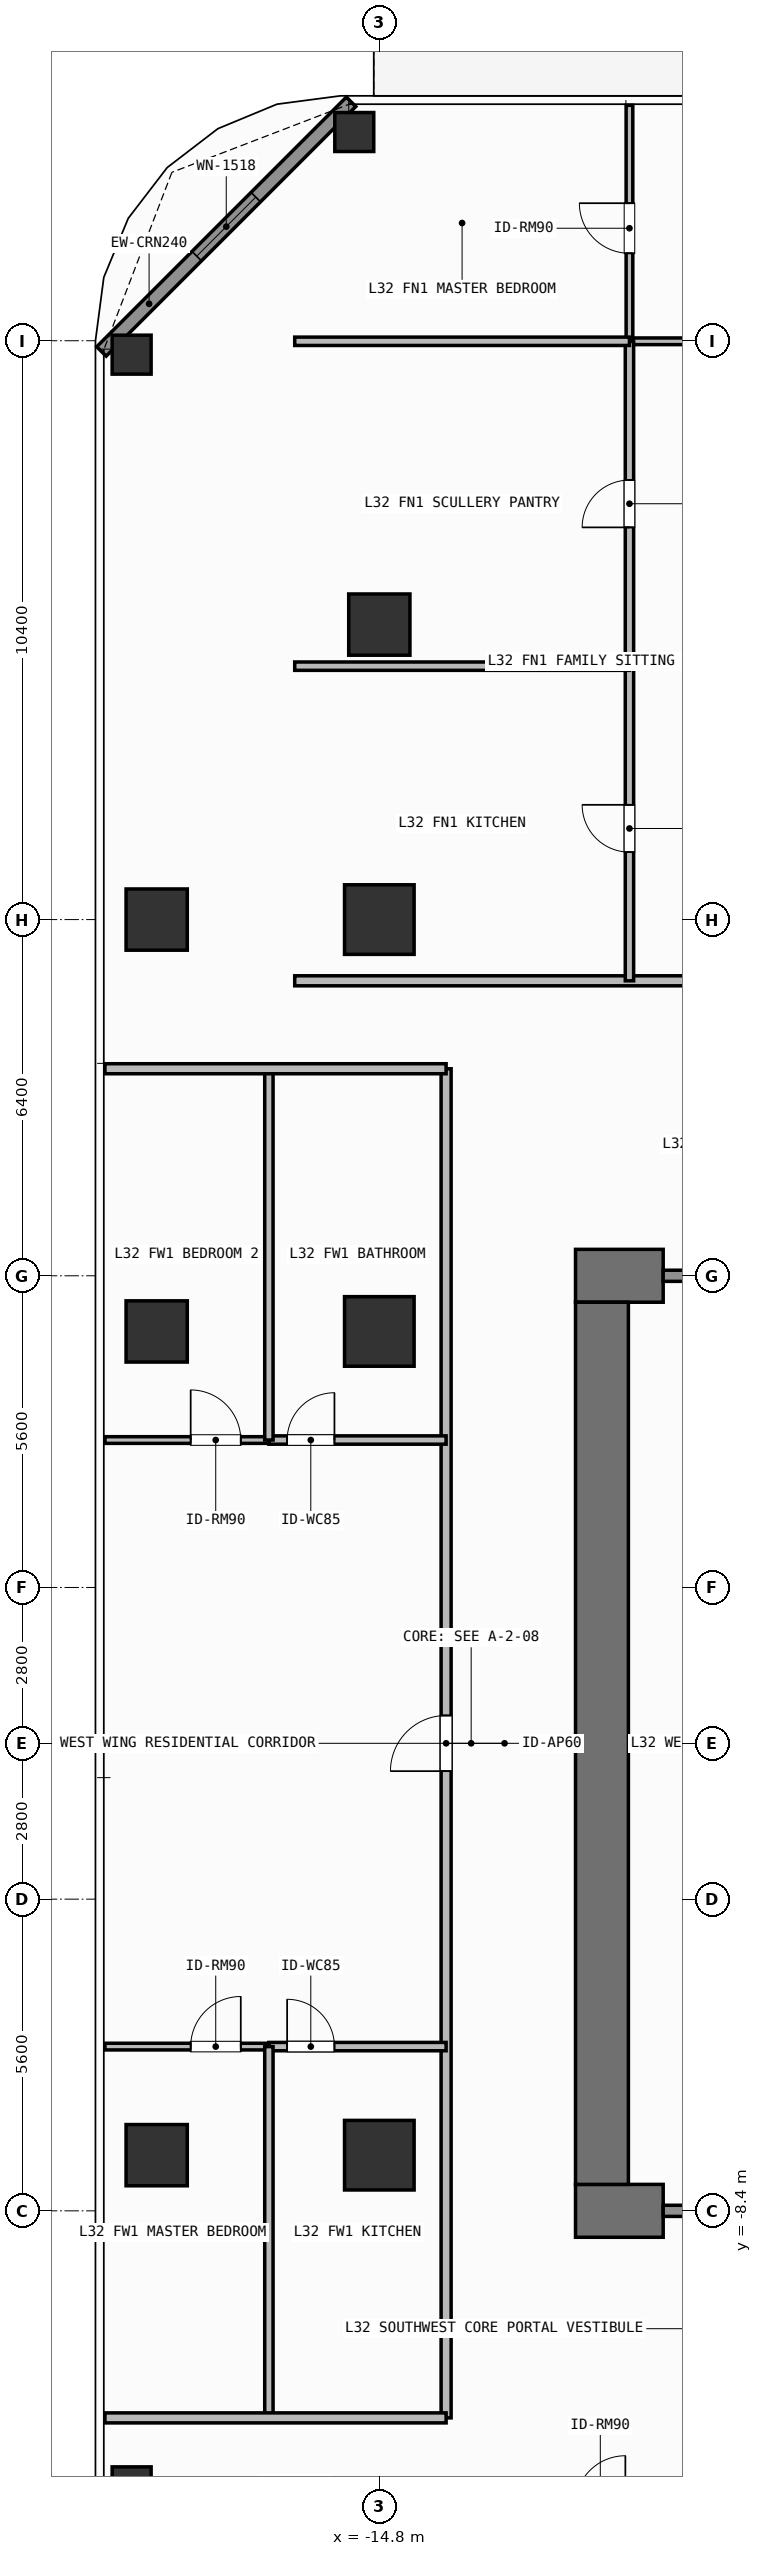
"""IFC4 building model, lengths in metres.
Left out: names, types, materials, properties, quantities, classifications, styles, units other than length and angle.
Written with IfcOpenShell. Run it as: python <this file> out.ifc"""

import sys

from ifc_helpers import new_model, si_unit, direction, frame, frame_2d, origin, origin_2d, place, context, subcontext, project, spatial, rectangle, hollow_rectangle, extrude, element, fill, save


model = new_model("IFC4")
c1 = context("Model", 3, precision=1e-05, world=origin(), true_north=direction((0.0, 1.0)))
c2 = subcontext(c1, "Body", "Model", "MODEL_VIEW")
j1 = project(units=[si_unit("LENGTHUNIT", "METRE"), si_unit("PLANEANGLEUNIT", "RADIAN")], contexts=[c1])
p1 = place(None, origin())
s1 = spatial("IfcSite", under=j1, at=p1, CompositionType="ELEMENT")
p2 = place(p1, origin())
s2 = spatial("IfcBuilding", under=s1, at=p2, CompositionType="ELEMENT")
p3 = place(p2, frame((0.0, 0.0, 129.0)))
s3 = spatial("IfcBuildingStorey", under=s2, at=p3, CompositionType="ELEMENT", Elevation=129.0)
for number, where, z_axis, x_axis in (
    (1, (-11.275, -8.4, 0.0), (0.0, 0.0, 1.0), (1.0, 0.0, 0.0)),
    (2, (-11.275, 8.4, 0.0), (0.0, 0.0, 1.0), (1.0, 0.0, 0.0)),
):
    element("IfcWall", number, at=place(p3, frame(where, z_axis=z_axis, x_axis=x_axis)), inside=s3, PredefinedType="SHEAR", context=c2, shape_type="SweptSolid", body=[
        extrude(rectangle(XDim=1.575, YDim=0.95, at=frame_2d((0.788, 0.0))), origin(), (0.0, 0.0, 1.0), 3.9),
    ])
p4 = place(p3, frame((-10.8, -7.925, 0.0), z_axis=(0.0, 0.0, 1.0), x_axis=(0.0, 1.0, 0.0)))
e3 = element("IfcWall", 3, at=p4, inside=s3, PredefinedType="SHEAR", context=c2, shape_type="SweptSolid", body=[
    extrude(rectangle(XDim=15.85, YDim=0.95, at=frame_2d((7.925, 0.0))), origin(), (0.0, 0.0, 1.0), 3.9),
])
for number, where, z_axis, x_axis in (
    (4, (-14.8, 14.8, 0.0), (0.0, 0.0, 1.0), (1.0, 0.0, 0.0)),
    (5, (-14.8, -7.4, 0.0), (0.0, 0.0, 1.0), (1.0, 0.0, 0.0)),
    (6, (-14.8, 7.4, 0.0), (0.0, 0.0, 1.0), (1.0, 0.0, 0.0)),
):
    element("IfcColumn", number, at=place(p3, frame(where, z_axis=z_axis, x_axis=x_axis)), inside=s3, PredefinedType="COLUMN", context=c2, shape_type="SweptSolid", body=[
        extrude(rectangle(XDim=1.25, YDim=1.25, at=origin_2d()), origin(), (0.0, 0.0, 1.0), 3.9),
    ])
for number, where, z_axis, x_axis in (
    (7, (-18.8, -7.4, 0.0), (0.0, 0.0, 1.0), (1.0, 0.0, 0.0)),
    (8, (-18.8, 7.4, 0.0), (0.0, 0.0, 1.0), (1.0, 0.0, 0.0)),
    (9, (-18.8, 14.8, 0.0), (0.0, 0.0, 1.0), (1.0, 0.0, 0.0)),
    (10, (-14.8, 20.1, 0.0), (0.0, 0.0, 1.0), (1.0, 0.0, 0.0)),
):
    element("IfcColumn", number, at=place(p3, frame(where, z_axis=z_axis, x_axis=x_axis)), inside=s3, PredefinedType="COLUMN", context=c2, shape_type="SweptSolid", body=[
        extrude(rectangle(XDim=1.1, YDim=1.1, at=origin_2d()), origin(), (0.0, 0.0, 1.0), 3.9),
    ])
for number, where, z_axis, x_axis in (
    (11, (-15.25, 28.95, 0.0), (0.0, 0.0, 1.0), (1.0, 0.0, 0.0)),
    (12, (-19.25, -13.35, 0.0), (0.0, 0.0, 1.0), (1.0, 0.0, 0.0)),
    (13, (-19.25, 24.95, 0.0), (0.0, 0.0, 1.0), (1.0, 0.0, 0.0)),
):
    element("IfcColumn", number, at=place(p3, frame(where, z_axis=z_axis, x_axis=x_axis)), inside=s3, PredefinedType="COLUMN", context=c2, shape_type="SweptSolid", body=[
        extrude(hollow_rectangle(XDim=0.7, YDim=0.7, WallThickness=0.032, at=origin_2d()), origin(), (0.0, 0.0, 1.0), 3.9),
    ])
p5 = place(p3, frame((-19.792, 25.008, 0.0), z_axis=(0.0, 0.0, 1.0), x_axis=(0.707106781187, 0.707106781187, 0.0)))
e14 = element("IfcWall", 14, at=p5, inside=s3, PredefinedType="SOLIDWALL", context=c2, shape_type="SweptSolid", body=[
    extrude(rectangle(XDim=6.343, YDim=0.24, at=frame_2d((3.171, 0.0))), origin(), (0.0, 0.0, 1.0), 3.68),
])
p6 = place(p5, frame((2.421, 0.0, 0.8)))
e15 = element("IfcOpeningElement", 15, at=p6, cuts=e14, PredefinedType="OPENING", context=c2, shape_type="SweptSolid", body=[
    extrude(rectangle(XDim=1.5, YDim=1.85, at=frame_2d((0.75, 0.925))), frame((0.0, 0.13, 0.0), z_axis=(0.0, -1.0, 0.0), x_axis=(1.0, 0.0, 0.0)), (0.0, 0.0, 1.0), 0.26),
])
p7 = place(p3, frame((-9.7, -8.4, 0.0), z_axis=(0.0, 0.0, 1.0), x_axis=(1.0, 0.0, 0.0)))
e16 = element("IfcWall", 16, at=p7, inside=s3, PredefinedType="SOLIDWALL", context=c2, shape_type="SweptSolid", body=[
    extrude(rectangle(XDim=2.15, YDim=0.2, at=frame_2d((1.075, 0.0))), origin(), (0.0, 0.0, 1.0), 2.72),
])
p8 = place(p7, frame((0.598, 0.0, 0.0)))
e17 = element("IfcOpeningElement", 17, at=p8, cuts=e16, PredefinedType="OPENING", context=c2, shape_type="SweptSolid", body=[
    extrude(rectangle(XDim=1.1, YDim=2.15, at=frame_2d((0.55, 1.075))), frame((0.0, 0.11, 0.0), z_axis=(0.0, -1.0, 0.0), x_axis=(1.0, 0.0, 0.0)), (0.0, 0.0, 1.0), 0.22),
])
p9 = place(p3, frame((-9.7, 8.4, 0.0), z_axis=(0.0, 0.0, 1.0), x_axis=(1.0, 0.0, 0.0)))
e18 = element("IfcWall", 18, at=p9, inside=s3, PredefinedType="SOLIDWALL", context=c2, shape_type="SweptSolid", body=[
    extrude(rectangle(XDim=2.15, YDim=0.2, at=frame_2d((1.075, 0.0))), origin(), (0.0, 0.0, 1.0), 2.72),
])
p10 = place(p9, frame((0.598, 0.0, 0.0)))
e19 = element("IfcOpeningElement", 19, at=p10, cuts=e18, PredefinedType="OPENING", context=c2, shape_type="SweptSolid", body=[
    extrude(rectangle(XDim=1.1, YDim=2.15, at=frame_2d((0.55, 1.075))), frame((0.0, 0.11, 0.0), z_axis=(0.0, -1.0, 0.0), x_axis=(1.0, 0.0, 0.0)), (0.0, 0.0, 1.0), 0.22),
])
p11 = place(p3, frame((-16.32, 13.7, 0.0), z_axis=(0.0, 0.0, 1.0), x_axis=(1.0, 0.0, 0.0)))
e20 = element("IfcWall", 20, at=p11, inside=s3, PredefinedType="PARTITIONING", context=c2, shape_type="SweptSolid", body=[
    extrude(rectangle(XDim=17.794, YDim=0.18, at=frame_2d((8.897, 0.0))), origin(), (0.0, 0.0, 1.0), 3.68),
])
p12 = place(p11, frame((9.65, 0.0, 0.0)))
e21 = element("IfcOpeningElement", 21, at=p12, cuts=e20, PredefinedType="OPENING", context=c2, shape_type="SweptSolid", body=[
    extrude(rectangle(XDim=1.0, YDim=2.2, at=frame_2d((0.5, 1.1))), frame((0.0, 0.1, 0.0), z_axis=(0.0, -1.0, 0.0), x_axis=(1.0, 0.0, 0.0)), (0.0, 0.0, 1.0), 0.2),
])
p13 = place(p3, frame((-10.306, 25.19, 0.0), z_axis=(0.0, 0.0, 1.0), x_axis=(1.0, 0.0, 0.0)))
e22 = element("IfcWall", 22, at=p13, inside=s3, PredefinedType="PARTITIONING", context=c2, shape_type="SweptSolid", body=[
    extrude(rectangle(XDim=6.228, YDim=0.12, at=frame_2d((3.114, 0.0))), origin(), (0.0, 0.0, 1.0), 3.68),
])
p14 = place(p13, frame((2.664, 0.0, 0.0)))
e23 = element("IfcOpeningElement", 23, at=p14, cuts=e22, PredefinedType="OPENING", context=c2, shape_type="SweptSolid", body=[
    extrude(rectangle(XDim=0.9, YDim=2.1, at=frame_2d((0.45, 1.05))), frame((0.0, 0.07, 0.0), z_axis=(0.0, -1.0, 0.0), x_axis=(1.0, 0.0, 0.0)), (0.0, 0.0, 1.0), 0.14),
])
p15 = place(p3, frame((-10.306, 13.7, 0.0), z_axis=(0.0, 0.0, 1.0), x_axis=(0.0, 1.0, 0.0)))
e24 = element("IfcWall", 24, at=p15, inside=s3, PredefinedType="PARTITIONING", context=c2, shape_type="SweptSolid", body=[
    extrude(rectangle(XDim=5.653, YDim=0.15, at=frame_2d((2.827, 0.0))), origin(), (0.0, 0.0, 1.0), 3.68),
])
p16 = place(p15, frame((2.312, 0.0, 0.0)))
e25 = element("IfcOpeningElement", 25, at=p16, cuts=e24, PredefinedType="OPENING", context=c2, shape_type="SweptSolid", body=[
    extrude(rectangle(XDim=0.85, YDim=2.1, at=frame_2d((0.425, 1.05))), frame((0.0, 0.085, 0.0), z_axis=(0.0, -1.0, 0.0), x_axis=(1.0, 0.0, 0.0)), (0.0, 0.0, 1.0), 0.17),
])
p17 = place(p3, frame((-10.306, 19.353, 0.0), z_axis=(0.0, 0.0, 1.0), x_axis=(0.0, 1.0, 0.0)))
e26 = element("IfcWall", 26, at=p17, inside=s3, PredefinedType="PARTITIONING", context=c2, shape_type="SweptSolid", body=[
    extrude(rectangle(XDim=5.837, YDim=0.15, at=frame_2d((2.918, 0.0))), origin(), (0.0, 0.0, 1.0), 3.68),
])
p18 = place(p17, frame((2.493, 0.0, 0.0)))
e27 = element("IfcOpeningElement", 27, at=p18, cuts=e26, PredefinedType="OPENING", context=c2, shape_type="SweptSolid", body=[
    extrude(rectangle(XDim=0.85, YDim=2.1, at=frame_2d((0.425, 1.05))), frame((0.0, 0.085, 0.0), z_axis=(0.0, -1.0, 0.0), x_axis=(1.0, 0.0, 0.0)), (0.0, 0.0, 1.0), 0.17),
])
p19 = place(p3, frame((-10.306, 25.19, 0.0), z_axis=(0.0, 0.0, 1.0), x_axis=(0.0, 1.0, 0.0)))
e28 = element("IfcWall", 28, at=p19, inside=s3, PredefinedType="PARTITIONING", context=c2, shape_type="SweptSolid", body=[
    extrude(rectangle(XDim=4.24, YDim=0.12, at=frame_2d((2.12, 0.0))), origin(), (0.0, 0.0, 1.0), 3.68),
])
p20 = place(p19, frame((1.581, 0.0, 0.0)))
e29 = element("IfcOpeningElement", 29, at=p20, cuts=e28, PredefinedType="OPENING", context=c2, shape_type="SweptSolid", body=[
    extrude(rectangle(XDim=0.9, YDim=2.1, at=frame_2d((0.45, 1.05))), frame((0.0, 0.07, 0.0), z_axis=(0.0, -1.0, 0.0), x_axis=(1.0, 0.0, 0.0)), (0.0, 0.0, 1.0), 0.14),
])
p21 = place(p3, frame((-13.6, -12.12, 0.0), z_axis=(0.0, 0.0, 1.0), x_axis=(0.0, 1.0, 0.0)))
e30 = element("IfcWall", 30, at=p21, inside=s3, PredefinedType="PARTITIONING", context=c2, shape_type="SweptSolid", body=[
    extrude(rectangle(XDim=24.24, YDim=0.18, at=frame_2d((12.12, 0.0))), origin(), (0.0, 0.0, 1.0), 3.68),
])
p22 = place(p21, frame((11.62, 0.0, 0.0)))
e31 = element("IfcOpeningElement", 31, at=p22, cuts=e30, PredefinedType="OPENING", context=c2, shape_type="SweptSolid", body=[
    extrude(rectangle(XDim=1.0, YDim=2.2, at=frame_2d((0.5, 1.1))), frame((0.0, 0.1, 0.0), z_axis=(0.0, -1.0, 0.0), x_axis=(1.0, 0.0, 0.0)), (0.0, 0.0, 1.0), 0.2),
])
p23 = place(p3, frame((-16.784, 5.449, 0.0), z_axis=(0.0, 0.0, 1.0), x_axis=(1.0, 0.0, 0.0)))
e32 = element("IfcWall", 32, at=p23, inside=s3, PredefinedType="PARTITIONING", context=c2, shape_type="SweptSolid", body=[
    extrude(rectangle(XDim=3.184, YDim=0.15, at=frame_2d((1.592, 0.0))), origin(), (0.0, 0.0, 1.0), 3.68),
])
p24 = place(p23, frame((0.328, 0.0, 0.0)))
e33 = element("IfcOpeningElement", 33, at=p24, cuts=e32, PredefinedType="OPENING", context=c2, shape_type="SweptSolid", body=[
    extrude(rectangle(XDim=0.85, YDim=2.1, at=frame_2d((0.425, 1.05))), frame((0.0, 0.085, 0.0), z_axis=(0.0, -1.0, 0.0), x_axis=(1.0, 0.0, 0.0)), (0.0, 0.0, 1.0), 0.17),
])
p25 = place(p3, frame((-16.784, -5.449, 0.0), z_axis=(0.0, 0.0, 1.0), x_axis=(1.0, 0.0, 0.0)))
e34 = element("IfcWall", 34, at=p25, inside=s3, PredefinedType="PARTITIONING", context=c2, shape_type="SweptSolid", body=[
    extrude(rectangle(XDim=3.184, YDim=0.15, at=frame_2d((1.592, 0.0))), origin(), (0.0, 0.0, 1.0), 3.68),
])
p26 = place(p25, frame((0.328, 0.0, 0.0)))
e35 = element("IfcOpeningElement", 35, at=p26, cuts=e34, PredefinedType="OPENING", context=c2, shape_type="SweptSolid", body=[
    extrude(rectangle(XDim=0.85, YDim=2.1, at=frame_2d((0.425, 1.05))), frame((0.0, 0.085, 0.0), z_axis=(0.0, -1.0, 0.0), x_axis=(1.0, 0.0, 0.0)), (0.0, 0.0, 1.0), 0.17),
])
p27 = place(p3, frame((-19.73, -5.449, 0.0), z_axis=(0.0, 0.0, 1.0), x_axis=(1.0, 0.0, 0.0)))
e36 = element("IfcWall", 36, at=p27, inside=s3, PredefinedType="PARTITIONING", context=c2, shape_type="SweptSolid", body=[
    extrude(rectangle(XDim=2.946, YDim=0.12, at=frame_2d((1.473, 0.0))), origin(), (0.0, 0.0, 1.0), 3.68),
])
p28 = place(p27, frame((1.541, 0.0, 0.0)))
e37 = element("IfcOpeningElement", 37, at=p28, cuts=e36, PredefinedType="OPENING", context=c2, shape_type="SweptSolid", body=[
    extrude(rectangle(XDim=0.9, YDim=2.1, at=frame_2d((0.45, 1.05))), frame((0.0, 0.07, 0.0), z_axis=(0.0, -1.0, 0.0), x_axis=(1.0, 0.0, 0.0)), (0.0, 0.0, 1.0), 0.14),
])
p29 = place(p3, frame((-19.73, 5.449, 0.0), z_axis=(0.0, 0.0, 1.0), x_axis=(1.0, 0.0, 0.0)))
e38 = element("IfcWall", 38, at=p29, inside=s3, PredefinedType="PARTITIONING", context=c2, shape_type="SweptSolid", body=[
    extrude(rectangle(XDim=2.946, YDim=0.12, at=frame_2d((1.473, 0.0))), origin(), (0.0, 0.0, 1.0), 3.68),
])
p30 = place(p29, frame((1.541, 0.0, 0.0)))
e39 = element("IfcOpeningElement", 39, at=p30, cuts=e38, PredefinedType="OPENING", context=c2, shape_type="SweptSolid", body=[
    extrude(rectangle(XDim=0.9, YDim=2.1, at=frame_2d((0.45, 1.05))), frame((0.0, 0.07, 0.0), z_axis=(0.0, -1.0, 0.0), x_axis=(1.0, 0.0, 0.0)), (0.0, 0.0, 1.0), 0.14),
])
for number, where, z_axis, x_axis in (
    (40, (-16.32, 19.353, 0.0), (0.0, 0.0, 1.0), (1.0, 0.0, 0.0)),
    (41, (-16.32, 25.19, 0.0), (0.0, 0.0, 1.0), (1.0, 0.0, 0.0)),
):
    element("IfcWall", number, at=place(p3, frame(where, z_axis=z_axis, x_axis=x_axis)), inside=s3, PredefinedType="PARTITIONING", context=c2, shape_type="SweptSolid", body=[
        extrude(rectangle(XDim=6.014, YDim=0.15, at=frame_2d((3.007, 0.0))), origin(), (0.0, 0.0, 1.0), 3.68),
    ])
for number, where, z_axis, x_axis in (
    (42, (-16.784, -12.12, 0.0), (0.0, 0.0, 1.0), (0.0, 1.0, 0.0)),
    (43, (-16.784, 5.449, 0.0), (0.0, 0.0, 1.0), (0.0, 1.0, 0.0)),
):
    element("IfcWall", number, at=place(p3, frame(where, z_axis=z_axis, x_axis=x_axis)), inside=s3, PredefinedType="PARTITIONING", context=c2, shape_type="SweptSolid", body=[
        extrude(rectangle(XDim=6.671, YDim=0.15, at=frame_2d((3.335, 0.0))), origin(), (0.0, 0.0, 1.0), 3.68),
    ])
for number, where, z_axis, x_axis in (
    (44, (-19.73, -12.12, 0.0), (0.0, 0.0, 1.0), (1.0, 0.0, 0.0)),
    (45, (-19.73, 12.12, 0.0), (0.0, 0.0, 1.0), (1.0, 0.0, 0.0)),
):
    element("IfcWall", number, at=place(p3, frame(where, z_axis=z_axis, x_axis=x_axis)), inside=s3, PredefinedType="PARTITIONING", context=c2, shape_type="SweptSolid", body=[
        extrude(rectangle(XDim=6.13, YDim=0.18, at=frame_2d((3.065, 0.0))), origin(), (0.0, 0.0, 1.0), 3.68),
    ])
p31 = place(p6, origin())
e46 = element("IfcWindow", 46, at=p31, inside=s3, PartitioningType="SINGLE_PANEL", PredefinedType="WINDOW", context=c2, shape_type="SweptSolid", body=[
    extrude(rectangle(XDim=1.5, YDim=1.85, at=frame_2d((0.75, 0.925))), frame((0.0, 0.03, 0.0), z_axis=(0.0, -1.0, 0.0), x_axis=(1.0, 0.0, 0.0)), (0.0, 0.0, 1.0), 0.06),
])
fill(e15, e46)
p32 = place(p16, origin())
e47 = element("IfcDoor", 47, at=p32, inside=s3, OperationType="SINGLE_SWING_RIGHT", PredefinedType="DOOR", context=c2, shape_type="SweptSolid", body=[
    extrude(rectangle(XDim=0.85, YDim=2.1, at=frame_2d((0.425, 1.05))), frame((0.0, 0.025, 0.0), z_axis=(0.0, -1.0, 0.0), x_axis=(1.0, 0.0, 0.0)), (0.0, 0.0, 1.0), 0.05),
])
fill(e25, e47)
p33 = place(p18, origin())
e48 = element("IfcDoor", 48, at=p33, inside=s3, OperationType="SINGLE_SWING_LEFT", PredefinedType="DOOR", context=c2, shape_type="SweptSolid", body=[
    extrude(rectangle(XDim=0.85, YDim=2.1, at=frame_2d((0.425, 1.05))), frame((0.0, 0.025, 0.0), z_axis=(0.0, -1.0, 0.0), x_axis=(1.0, 0.0, 0.0)), (0.0, 0.0, 1.0), 0.05),
])
fill(e27, e48)
p34 = place(p20, origin())
e49 = element("IfcDoor", 49, at=p34, inside=s3, OperationType="SINGLE_SWING_RIGHT", PredefinedType="DOOR", context=c2, shape_type="SweptSolid", body=[
    extrude(rectangle(XDim=0.9, YDim=2.1, at=frame_2d((0.45, 1.05))), frame((0.0, 0.025, 0.0), z_axis=(0.0, -1.0, 0.0), x_axis=(1.0, 0.0, 0.0)), (0.0, 0.0, 1.0), 0.05),
])
fill(e29, e49)
p35 = place(p22, origin())
e50 = element("IfcDoor", 50, at=p35, inside=s3, OperationType="SINGLE_SWING_LEFT", PredefinedType="DOOR", context=c2, shape_type="SweptSolid", body=[
    extrude(rectangle(XDim=1.0, YDim=2.2, at=frame_2d((0.5, 1.1))), frame((0.0, 0.025, 0.0), z_axis=(0.0, -1.0, 0.0), x_axis=(1.0, 0.0, 0.0)), (0.0, 0.0, 1.0), 0.05),
])
fill(e31, e50)
p36 = place(p24, origin())
e51 = element("IfcDoor", 51, at=p36, inside=s3, OperationType="SINGLE_SWING_RIGHT", PredefinedType="DOOR", context=c2, shape_type="SweptSolid", body=[
    extrude(rectangle(XDim=0.85, YDim=2.1, at=frame_2d((0.425, 1.05))), frame((0.0, 0.025, 0.0), z_axis=(0.0, -1.0, 0.0), x_axis=(1.0, 0.0, 0.0)), (0.0, 0.0, 1.0), 0.05),
])
fill(e33, e51)
p37 = place(p26, origin())
e52 = element("IfcDoor", 52, at=p37, inside=s3, OperationType="SINGLE_SWING_LEFT", PredefinedType="DOOR", context=c2, shape_type="SweptSolid", body=[
    extrude(rectangle(XDim=0.85, YDim=2.1, at=frame_2d((0.425, 1.05))), frame((0.0, 0.025, 0.0), z_axis=(0.0, -1.0, 0.0), x_axis=(1.0, 0.0, 0.0)), (0.0, 0.0, 1.0), 0.05),
])
fill(e35, e52)
p38 = place(p28, origin())
e53 = element("IfcDoor", 53, at=p38, inside=s3, OperationType="SINGLE_SWING_RIGHT", PredefinedType="DOOR", context=c2, shape_type="SweptSolid", body=[
    extrude(rectangle(XDim=0.9, YDim=2.1, at=frame_2d((0.45, 1.05))), frame((0.0, 0.025, 0.0), z_axis=(0.0, -1.0, 0.0), x_axis=(1.0, 0.0, 0.0)), (0.0, 0.0, 1.0), 0.05),
])
fill(e37, e53)
p39 = place(p30, origin())
e54 = element("IfcDoor", 54, at=p39, inside=s3, OperationType="SINGLE_SWING_LEFT", PredefinedType="DOOR", context=c2, shape_type="SweptSolid", body=[
    extrude(rectangle(XDim=0.9, YDim=2.1, at=frame_2d((0.45, 1.05))), frame((0.0, 0.025, 0.0), z_axis=(0.0, -1.0, 0.0), x_axis=(1.0, 0.0, 0.0)), (0.0, 0.0, 1.0), 0.05),
])
fill(e39, e54)
save(model, sys.argv[1])
